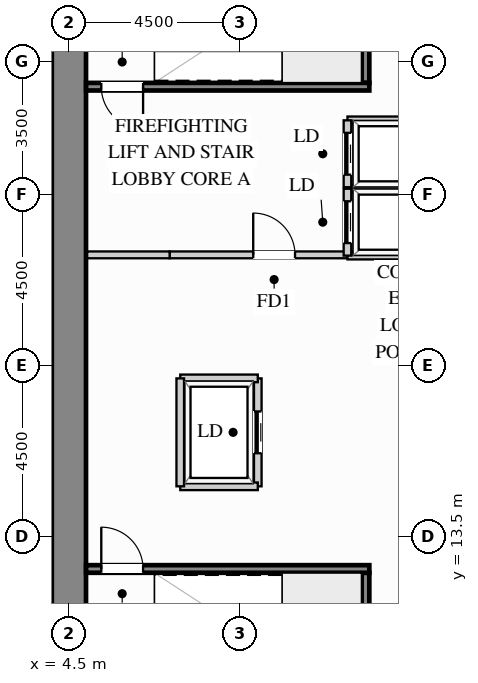
"""IFC4 building model, lengths in metres.
Left out: names, types, materials, properties, quantities, classifications, styles, units other than length and angle.
Written with IfcOpenShell. Run it as: python <this file> out.ifc"""

import sys

from ifc_helpers import new_model, si_unit, direction, frame, frame_2d, origin, place, context, subcontext, project, spatial, rectangle, extrude, source, transform, mapped, element, fill, save


model = new_model("IFC4")
c1 = context("Model", 3, precision=1e-05, world=origin(), true_north=direction((0.0, 1.0)))
c2 = subcontext(c1, "Body", "Model", "MODEL_VIEW")
j1 = project(units=[si_unit("LENGTHUNIT", "METRE"), si_unit("PLANEANGLEUNIT", "RADIAN")], contexts=[c1])
p1 = place(None, origin())
s1 = spatial("IfcSite", under=j1, at=p1, CompositionType="ELEMENT")
p2 = place(p1, origin())
s2 = spatial("IfcBuilding", under=s1, at=p2, CompositionType="ELEMENT")
p3 = place(p2, frame((0.0, 0.0, -4.5)))
s3 = spatial("IfcBuildingStorey", under=s2, at=p3, CompositionType="ELEMENT", Elevation=-4.5)
m1 = source(origin(), c2, "Body", "SweptSolid", [
    extrude(rectangle(XDim=20.1, YDim=0.9, at=frame_2d((10.05, 0.0))), origin(), (0.0, 0.0, 1.0), 4.24),
])
p4 = place(p3, frame((4.5, 8.95, 0.0), z_axis=(0.0, 0.0, 1.0), x_axis=(0.0, 1.0, 0.0)))
e1 = element("IfcWall", 1, at=p4, inside=s3, PredefinedType="SHEAR", context=c2, shape_type="MappedRepresentation", body=[
    mapped(m1, transform((0.0, 0.0, 0.0), x_axis=(1.0, 0.0, 0.0), y_axis=(0.0, 1.0, 0.0), z_axis=(0.0, 0.0, 1.0))),
])
p5 = place(p3, frame((7.15, 20.92, 0.0), z_axis=(0.0, 0.0, 1.0), x_axis=(1.0, 0.0, 0.0)))
e2 = element("IfcWall", 2, at=p5, inside=s3, PredefinedType="PARTITIONING", context=c2, shape_type="SweptSolid", body=[
    extrude(rectangle(XDim=4.68, YDim=0.18, at=frame_2d((2.34, 0.0))), origin(), (0.0, 0.0, 1.0), 4.225),
])
p6 = place(p5, frame((2.2, 0.0, 0.0)))
e3 = element("IfcOpeningElement", 3, at=p6, cuts=e2, PredefinedType="OPENING", context=c2, shape_type="SweptSolid", body=[
    extrude(rectangle(XDim=1.1, YDim=2.15, at=frame_2d((0.55, 1.075))), frame((0.0, 0.1, 0.0), z_axis=(0.0, -1.0, 0.0), x_axis=(1.0, 0.0, 0.0)), (0.0, 0.0, 1.0), 0.2),
])
m2 = source(origin(), c2, "Body", "SweptSolid", [
    extrude(rectangle(XDim=2.17, YDim=0.18, at=frame_2d((1.085, 0.0))), origin(), (0.0, 0.0, 1.0), 4.225),
])
p7 = place(p3, frame((4.98, 20.92, 0.0), z_axis=(0.0, 0.0, 1.0), x_axis=(1.0, 0.0, 0.0)))
e4 = element("IfcWall", 4, at=p7, inside=s3, PredefinedType="PARTITIONING", context=c2, shape_type="MappedRepresentation", body=[
    mapped(m2, transform((0.0, 0.0, 0.0), x_axis=(1.0, 0.0, 0.0), y_axis=(0.0, 1.0, 0.0), z_axis=(0.0, 0.0, 1.0))),
])
m3 = source(origin(), c2, "Body", "SweptSolid", [
    extrude(rectangle(XDim=2.19, YDim=0.2, at=frame_2d((1.095, 0.0))), origin(), (0.0, 0.0, 1.0), 4.225),
])
for number, where, z_axis, x_axis in (
    (5, (11.83, 22.66, 0.0), (0.0, 0.0, 1.0), (1.0, 0.0, 0.0)),
    (6, (11.83, 20.9, 0.0), (0.0, 0.0, 1.0), (1.0, 0.0, 0.0)),
):
    element("IfcWall", number, at=place(p3, frame(where, z_axis=z_axis, x_axis=x_axis)), inside=s3, PredefinedType="PARTITIONING", context=c2, shape_type="MappedRepresentation", body=[
        mapped(m3, transform((0.0, 0.0, 0.0), x_axis=(1.0, 0.0, 0.0), y_axis=(0.0, 1.0, 0.0), z_axis=(0.0, 0.0, 1.0))),
    ])
p8 = place(p3, frame((11.83, 20.9, 0.0), z_axis=(0.0, 0.0, 1.0), x_axis=(0.0, 1.0, 0.0)))
e7 = element("IfcWall", 7, at=p8, inside=s3, PredefinedType="PARTITIONING", context=c2, shape_type="SweptSolid", body=[
    extrude(rectangle(XDim=1.76, YDim=0.2, at=frame_2d((0.88, 0.0))), origin(), (0.0, 0.0, 1.0), 4.225),
])
p9 = place(p8, frame((0.33, 0.0, 0.0)))
e8 = element("IfcOpeningElement", 8, at=p9, cuts=e7, PredefinedType="OPENING", context=c2, shape_type="SweptSolid", body=[
    extrude(rectangle(XDim=1.1, YDim=2.2, at=frame_2d((0.55, 1.1))), frame((0.0, 0.11, 0.0), z_axis=(0.0, -1.0, 0.0), x_axis=(1.0, 0.0, 0.0)), (0.0, 0.0, 1.0), 0.22),
])
p10 = place(p3, frame((11.83, 24.46, 0.0), z_axis=(0.0, 0.0, 1.0), x_axis=(1.0, 0.0, 0.0)))
e9 = element("IfcWall", 9, at=p10, inside=s3, PredefinedType="PARTITIONING", context=c2, shape_type="MappedRepresentation", body=[
    mapped(m3, transform((0.0, 0.0, 0.0), x_axis=(1.0, 0.0, 0.0), y_axis=(0.0, 1.0, 0.0), z_axis=(0.0, 0.0, 1.0))),
])
p11 = place(p3, frame((11.83, 22.7, 0.0), z_axis=(0.0, 0.0, 1.0), x_axis=(0.0, 1.0, 0.0)))
e10 = element("IfcWall", 10, at=p11, inside=s3, PredefinedType="PARTITIONING", context=c2, shape_type="SweptSolid", body=[
    extrude(rectangle(XDim=1.76, YDim=0.2, at=frame_2d((0.88, 0.0))), origin(), (0.0, 0.0, 1.0), 4.225),
])
p12 = place(p11, frame((0.33, 0.0, 0.0)))
e11 = element("IfcOpeningElement", 11, at=p12, cuts=e10, PredefinedType="OPENING", context=c2, shape_type="SweptSolid", body=[
    extrude(rectangle(XDim=1.1, YDim=2.2, at=frame_2d((0.55, 1.1))), frame((0.0, 0.11, 0.0), z_axis=(0.0, -1.0, 0.0), x_axis=(1.0, 0.0, 0.0)), (0.0, 0.0, 1.0), 0.22),
])
p13 = place(p3, frame((9.47, 14.83, 0.0), z_axis=(0.0, 0.0, 1.0), x_axis=(0.0, 1.0, 0.0)))
e12 = element("IfcWall", 12, at=p13, inside=s3, PredefinedType="PARTITIONING", context=c2, shape_type="SweptSolid", body=[
    extrude(rectangle(XDim=2.84, YDim=0.2, at=frame_2d((1.42, 0.0))), origin(), (0.0, 0.0, 1.0), 4.225),
])
p14 = place(p13, frame((0.87, 0.0, 0.0)))
e13 = element("IfcOpeningElement", 13, at=p14, cuts=e12, PredefinedType="OPENING", context=c2, shape_type="SweptSolid", body=[
    extrude(rectangle(XDim=1.1, YDim=2.2, at=frame_2d((0.55, 1.1))), frame((0.0, 0.11, 0.0), z_axis=(0.0, -1.0, 0.0), x_axis=(1.0, 0.0, 0.0)), (0.0, 0.0, 1.0), 0.22),
])
m4 = source(origin(), c2, "Body", "SweptSolid", [
    extrude(rectangle(XDim=2.04, YDim=0.2, at=frame_2d((1.02, 0.0))), origin(), (0.0, 0.0, 1.0), 4.225),
])
for number, where, z_axis, x_axis in (
    (14, (7.43, 17.67, 0.0), (0.0, 0.0, 1.0), (1.0, 0.0, 0.0)),
    (15, (7.43, 14.83, 0.0), (0.0, 0.0, 1.0), (1.0, 0.0, 0.0)),
):
    element("IfcWall", number, at=place(p3, frame(where, z_axis=z_axis, x_axis=x_axis)), inside=s3, PredefinedType="PARTITIONING", context=c2, shape_type="MappedRepresentation", body=[
        mapped(m4, transform((0.0, 0.0, 0.0), x_axis=(1.0, 0.0, 0.0), y_axis=(0.0, 1.0, 0.0), z_axis=(0.0, 0.0, 1.0))),
    ])
m5 = source(origin(), c2, "Body", "SweptSolid", [
    extrude(rectangle(XDim=2.84, YDim=0.2, at=frame_2d((1.42, 0.0))), origin(), (0.0, 0.0, 1.0), 4.225),
])
p15 = place(p3, frame((7.43, 14.83, 0.0), z_axis=(0.0, 0.0, 1.0), x_axis=(0.0, 1.0, 0.0)))
e16 = element("IfcWall", 16, at=p15, inside=s3, PredefinedType="PARTITIONING", context=c2, shape_type="MappedRepresentation", body=[
    mapped(m5, transform((0.0, 0.0, 0.0), x_axis=(1.0, 0.0, 0.0), y_axis=(0.0, 1.0, 0.0), z_axis=(0.0, 0.0, 1.0))),
])
m6 = source(origin(), c2, "Body", "SweptSolid", [
    extrude(rectangle(XDim=3.603, YDim=0.2, at=frame_2d((1.802, 0.0))), origin(), (0.0, 0.0, 1.0), 4.24),
])
p16 = place(p3, frame((12.305, 8.952, 0.0), z_axis=(0.0, 0.0, 1.0), x_axis=(0.0, 1.0, 0.0)))
e17 = element("IfcWall", 17, at=p16, inside=s3, PredefinedType="SHEAR", context=c2, shape_type="MappedRepresentation", body=[
    mapped(m6, transform((0.0, 0.0, 0.0), x_axis=(1.0, 0.0, 0.0), y_axis=(0.0, 1.0, 0.0), z_axis=(0.0, 0.0, 1.0))),
])
p17 = place(p3, frame((4.952, 12.655, 0.0), z_axis=(0.0, 0.0, 1.0), x_axis=(1.0, 0.0, 0.0)))
e18 = element("IfcWall", 18, at=p17, inside=s3, PredefinedType="SHEAR", context=c2, shape_type="SweptSolid", body=[
    extrude(rectangle(XDim=7.453, YDim=0.2, at=frame_2d((3.727, 0.0))), origin(), (0.0, 0.0, 1.0), 4.24),
])
p18 = place(p17, frame((0.4, 0.0, 0.0)))
e19 = element("IfcOpeningElement", 19, at=p18, cuts=e18, PredefinedType="OPENING", context=c2, shape_type="SweptSolid", body=[
    extrude(rectangle(XDim=1.1, YDim=2.15, at=frame_2d((0.55, 1.075))), frame((0.0, 0.11, 0.0), z_axis=(0.0, -1.0, 0.0), x_axis=(1.0, 0.0, 0.0)), (0.0, 0.0, 1.0), 0.22),
])
p19 = place(p3, frame((12.305, 25.445, 0.0), z_axis=(0.0, 0.0, 1.0), x_axis=(0.0, 1.0, 0.0)))
e20 = element("IfcWall", 20, at=p19, inside=s3, PredefinedType="SHEAR", context=c2, shape_type="MappedRepresentation", body=[
    mapped(m6, transform((0.0, 0.0, 0.0), x_axis=(1.0, 0.0, 0.0), y_axis=(0.0, 1.0, 0.0), z_axis=(0.0, 0.0, 1.0))),
])
p20 = place(p3, frame((4.952, 25.345, 0.0), z_axis=(0.0, 0.0, 1.0), x_axis=(1.0, 0.0, 0.0)))
e21 = element("IfcWall", 21, at=p20, inside=s3, PredefinedType="SHEAR", context=c2, shape_type="SweptSolid", body=[
    extrude(rectangle(XDim=7.453, YDim=0.2, at=frame_2d((3.727, 0.0))), origin(), (0.0, 0.0, 1.0), 4.24),
])
p21 = place(p20, frame((0.4, 0.0, 0.0)))
e22 = element("IfcOpeningElement", 22, at=p21, cuts=e21, PredefinedType="OPENING", context=c2, shape_type="SweptSolid", body=[
    extrude(rectangle(XDim=1.1, YDim=2.15, at=frame_2d((0.55, 1.075))), frame((0.0, 0.11, 0.0), z_axis=(0.0, -1.0, 0.0), x_axis=(1.0, 0.0, 0.0)), (0.0, 0.0, 1.0), 0.22),
])
m7 = source(origin(), c2, "Body", "SweptSolid", [
    extrude(rectangle(XDim=1.1, YDim=2.15, at=frame_2d((0.55, 1.075))), frame((0.0, 0.025, 0.0), z_axis=(0.0, -1.0, 0.0), x_axis=(1.0, 0.0, 0.0)), (0.0, 0.0, 1.0), 0.05),
])
p22 = place(p6, origin())
e23 = element("IfcDoor", 23, at=p22, inside=s3, OperationType="SINGLE_SWING_LEFT", PredefinedType="DOOR", context=c2, shape_type="MappedRepresentation", body=[
    mapped(m7, transform((0.0, 0.0, 0.0), x_axis=(1.0, 0.0, 0.0), y_axis=(0.0, 1.0, 0.0), z_axis=(0.0, 0.0, 1.0))),
])
fill(e3, e23)
m8 = source(origin(), c2, "Body", "SweptSolid", [
    extrude(rectangle(XDim=1.1, YDim=2.2, at=frame_2d((0.55, 1.1))), frame((0.0, 0.025, 0.0), z_axis=(0.0, -1.0, 0.0), x_axis=(1.0, 0.0, 0.0)), (0.0, 0.0, 1.0), 0.05),
])
p23 = place(p9, origin())
e24 = element("IfcDoor", 24, at=p23, inside=s3, OperationType="SLIDING_TO_LEFT", PredefinedType="DOOR", context=c2, shape_type="MappedRepresentation", body=[
    mapped(m8, transform((0.0, 0.0, 0.0), x_axis=(1.0, 0.0, 0.0), y_axis=(0.0, 1.0, 0.0), z_axis=(0.0, 0.0, 1.0))),
])
fill(e8, e24)
p24 = place(p12, origin())
e25 = element("IfcDoor", 25, at=p24, inside=s3, OperationType="SLIDING_TO_LEFT", PredefinedType="DOOR", context=c2, shape_type="MappedRepresentation", body=[
    mapped(m8, transform((0.0, 0.0, 0.0), x_axis=(1.0, 0.0, 0.0), y_axis=(0.0, 1.0, 0.0), z_axis=(0.0, 0.0, 1.0))),
])
fill(e11, e25)
p25 = place(p14, origin())
e26 = element("IfcDoor", 26, at=p25, inside=s3, OperationType="SLIDING_TO_LEFT", PredefinedType="DOOR", context=c2, shape_type="MappedRepresentation", body=[
    mapped(m8, transform((0.0, 0.0, 0.0), x_axis=(1.0, 0.0, 0.0), y_axis=(0.0, 1.0, 0.0), z_axis=(0.0, 0.0, 1.0))),
])
fill(e13, e26)
m9 = source(origin(), c2, "Body", "SweptSolid", [
    extrude(rectangle(XDim=1.1, YDim=2.15, at=frame_2d((0.55, 1.075))), frame((0.0, 0.025, 0.0), z_axis=(0.0, -1.0, 0.0), x_axis=(1.0, 0.0, 0.0)), (0.0, 0.0, 1.0), 0.05),
])
p26 = place(p18, origin())
e27 = element("IfcDoor", 27, at=p26, inside=s3, OperationType="SINGLE_SWING_LEFT", PredefinedType="DOOR", context=c2, shape_type="MappedRepresentation", body=[
    mapped(m9, transform((0.0, 0.0, 0.0), x_axis=(1.0, 0.0, 0.0), y_axis=(0.0, 1.0, 0.0), z_axis=(0.0, 0.0, 1.0))),
])
fill(e19, e27)
p27 = place(p21, origin())
e28 = element("IfcDoor", 28, at=p27, inside=s3, OperationType="SINGLE_SWING_RIGHT", PredefinedType="DOOR", context=c2, shape_type="MappedRepresentation", body=[
    mapped(m9, transform((0.0, 0.0, 0.0), x_axis=(1.0, 0.0, 0.0), y_axis=(0.0, 1.0, 0.0), z_axis=(0.0, 0.0, 1.0))),
])
fill(e22, e28)
save(model, sys.argv[1])
